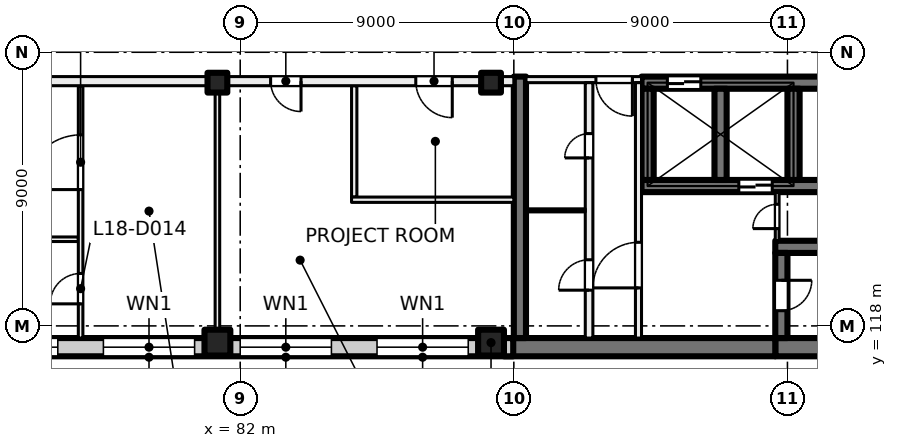
"""IFC4 building model, lengths in metres.
Left out: names, types, materials, properties, quantities, classifications, styles, units other than length and angle.
Written with IfcOpenShell. Run it as: python <this file> out.ifc"""

import sys

from ifc_helpers import new_model, si_unit, direction, frame, frame_2d, origin, origin_2d, place, context, subcontext, project, spatial, rectangle, extrude, element, fill, save


model = new_model("IFC4")
c1 = context("Model", 3, precision=1e-05, world=origin(), true_north=direction((0.0, 1.0)))
c2 = subcontext(c1, "Body", "Model", "MODEL_VIEW")
j1 = project(units=[si_unit("LENGTHUNIT", "METRE"), si_unit("PLANEANGLEUNIT", "RADIAN")], contexts=[c1])
p1 = place(None, origin())
s1 = spatial("IfcSite", under=j1, at=p1, CompositionType="ELEMENT")
p2 = place(p1, origin())
s2 = spatial("IfcBuilding", under=s1, at=p2, CompositionType="ELEMENT")
p3 = place(p2, frame((0.0, 0.0, 81.0)))
s3 = spatial("IfcBuildingStorey", under=s2, at=p3, CompositionType="ELEMENT", Elevation=81.0)
for number, where, z_axis, x_axis in (
    (1, (81.25, 126.0, 0.0), (0.0, 0.0, 1.0), (1.0, 0.0, 0.0)),
    (2, (90.25, 126.0, 0.0), (0.0, 0.0, 1.0), (1.0, 0.0, 0.0)),
):
    element("IfcColumn", number, at=place(p3, frame(where, z_axis=z_axis, x_axis=x_axis)), inside=s3, PredefinedType="COLUMN", context=c2, shape_type="SweptSolid", body=[
        extrude(rectangle(XDim=0.65, YDim=0.65, at=origin_2d()), origin(), (0.0, 0.0, 1.0), 4.0),
    ])
for number, where, z_axis, x_axis in (
    (3, (81.25, 117.45, 0.0), (0.0, 0.0, 1.0), (1.0, 0.0, 0.0)),
    (4, (90.25, 117.45, 0.0), (0.0, 0.0, 1.0), (1.0, 0.0, 0.0)),
):
    element("IfcColumn", number, at=place(p3, frame(where, z_axis=z_axis, x_axis=x_axis)), inside=s3, PredefinedType="COLUMN", context=c2, shape_type="SweptSolid", body=[
        extrude(rectangle(XDim=0.85, YDim=0.85, at=origin_2d()), origin(), (0.0, 0.0, 1.0), 4.0),
    ])
p4 = place(p3, frame((107.4, 117.3, 0.0), z_axis=(0.0, 0.0, 1.0), x_axis=(-1.0, 0.0, 0.0)))
e5 = element("IfcWall", 5, at=p4, inside=s3, PredefinedType="SHEAR", context=c2, shape_type="SweptSolid", body=[
    extrude(rectangle(XDim=7.8, YDim=0.6, at=frame_2d((3.9, 0.0))), origin(), (0.0, 0.0, 1.0), 4.0),
])
p5 = place(p3, frame((99.6, 117.3, 0.0), z_axis=(0.0, 0.0, 1.0), x_axis=(-1.0, 0.0, 0.0)))
e6 = element("IfcWall", 6, at=p5, inside=s3, PredefinedType="SHEAR", context=c2, shape_type="SweptSolid", body=[
    extrude(rectangle(XDim=8.925, YDim=0.6, at=frame_2d((4.462, 0.0))), origin(), (0.0, 0.0, 1.0), 4.0),
])
p6 = place(p3, frame((107.4, 120.6, 0.0), z_axis=(0.0, 0.0, 1.0), x_axis=(-1.0, 0.0, 0.0)))
e7 = element("IfcWall", 7, at=p6, inside=s3, PredefinedType="SHEAR", context=c2, shape_type="SweptSolid", body=[
    extrude(rectangle(XDim=7.8, YDim=0.4, at=frame_2d((3.9, 0.0))), origin(), (0.0, 0.0, 1.0), 4.0),
])
p7 = place(p3, frame((99.8, 120.4, 0.0), z_axis=(0.0, 0.0, 1.0), x_axis=(0.0, -1.0, 0.0)))
e8 = element("IfcWall", 8, at=p7, inside=s3, PredefinedType="SHEAR", context=c2, shape_type="SweptSolid", body=[
    extrude(rectangle(XDim=2.8, YDim=0.4, at=frame_2d((1.4, 0.0))), origin(), (0.0, 0.0, 1.0), 4.0),
])
p8 = place(p7, frame((0.9, 0.0, 0.0)))
e9 = element("IfcOpeningElement", 9, at=p8, cuts=e8, PredefinedType="OPENING", context=c2, shape_type="SweptSolid", body=[
    extrude(rectangle(XDim=1.0, YDim=2.1, at=frame_2d((0.5, 1.05))), frame((0.0, 0.21, 0.0), z_axis=(0.0, -1.0, 0.0), x_axis=(1.0, 0.0, 0.0)), (0.0, 0.0, 1.0), 0.42),
])
p9 = place(p3, frame((107.4, 126.0, 0.0), z_axis=(0.0, 0.0, 1.0), x_axis=(-1.0, 0.0, 0.0)))
e10 = element("IfcWall", 10, at=p9, inside=s3, PredefinedType="SHEAR", context=c2, shape_type="SweptSolid", body=[
    extrude(rectangle(XDim=12.2, YDim=0.4, at=frame_2d((6.1, 0.0))), origin(), (0.0, 0.0, 1.0), 4.0),
])
p10 = place(p9, frame((10.25, 0.0, 0.0)))
e11 = element("IfcOpeningElement", 11, at=p10, cuts=e10, PredefinedType="OPENING", context=c2, shape_type="SweptSolid", body=[
    extrude(rectangle(XDim=1.1, YDim=2.1, at=frame_2d((0.55, 1.05))), frame((0.0, 0.21, 0.0), z_axis=(0.0, -1.0, 0.0), x_axis=(1.0, 0.0, 0.0)), (0.0, 0.0, 1.0), 0.42),
])
p11 = place(p9, frame((0.7, 0.0, 0.0)))
e12 = element("IfcOpeningElement", 12, at=p11, cuts=e10, PredefinedType="OPENING", context=c2, shape_type="SweptSolid", body=[
    extrude(rectangle(XDim=0.8, YDim=2.1, at=frame_2d((0.4, 1.05))), frame((0.0, 0.21, 0.0), z_axis=(0.0, -1.0, 0.0), x_axis=(1.0, 0.0, 0.0)), (0.0, 0.0, 1.0), 0.42),
])
p12 = place(p3, frame((107.4, 122.6, 0.0), z_axis=(0.0, 0.0, 1.0), x_axis=(-1.0, 0.0, 0.0)))
e13 = element("IfcWall", 13, at=p12, inside=s3, PredefinedType="SHEAR", context=c2, shape_type="SweptSolid", body=[
    extrude(rectangle(XDim=12.2, YDim=0.4, at=frame_2d((6.1, 0.0))), origin(), (0.0, 0.0, 1.0), 4.0),
])
p13 = place(p12, frame((7.9, 0.0, 0.0)))
e14 = element("IfcOpeningElement", 14, at=p13, cuts=e13, PredefinedType="OPENING", context=c2, shape_type="SweptSolid", body=[
    extrude(rectangle(XDim=1.1, YDim=2.1, at=frame_2d((0.55, 1.05))), frame((0.0, 0.21, 0.0), z_axis=(0.0, -1.0, 0.0), x_axis=(1.0, 0.0, 0.0)), (0.0, 0.0, 1.0), 0.42),
])
for number, where, z_axis, x_axis in (
    (15, (100.2, 125.8, 0.0), (0.0, 0.0, 1.0), (0.0, -1.0, 0.0)),
    (16, (97.8, 125.8, 0.0), (0.0, 0.0, 1.0), (0.0, -1.0, 0.0)),
    (17, (95.4, 125.8, 0.0), (0.0, 0.0, 1.0), (0.0, -1.0, 0.0)),
):
    element("IfcWall", number, at=place(p3, frame(where, z_axis=z_axis, x_axis=x_axis)), inside=s3, PredefinedType="SHEAR", context=c2, shape_type="SweptSolid", body=[
        extrude(rectangle(XDim=3.0, YDim=0.4, at=frame_2d((1.5, 0.0))), origin(), (0.0, 0.0, 1.0), 4.0),
    ])
p14 = place(p3, frame((91.2, 126.2, 0.0), z_axis=(0.0, 0.0, 1.0), x_axis=(0.0, -1.0, 0.0)))
e18 = element("IfcWall", 18, at=p14, inside=s3, PredefinedType="SHEAR", context=c2, shape_type="SweptSolid", body=[
    extrude(rectangle(XDim=8.6, YDim=0.4, at=frame_2d((4.3, 0.0))), origin(), (0.0, 0.0, 1.0), 4.0),
])
p15 = place(p3, frame((90.98, 117.3, 0.0), z_axis=(0.0, 0.0, 1.0), x_axis=(-1.0, 0.0, 0.0)))
e19 = element("IfcWall", 19, at=p15, inside=s3, PredefinedType="SOLIDWALL", context=c2, shape_type="SweptSolid", body=[
    extrude(rectangle(XDim=33.745, YDim=0.6, at=frame_2d((16.873, 0.0))), origin(), (0.0, 0.0, 1.0), 3.625),
])
p16 = place(p15, frame((1.48, 0.0, 0.9)))
e20 = element("IfcOpeningElement", 20, at=p16, cuts=e19, PredefinedType="OPENING", context=c2, shape_type="SweptSolid", body=[
    extrude(rectangle(XDim=3.0, YDim=2.4, at=frame_2d((1.5, 1.2))), frame((0.0, 0.31, 0.0), z_axis=(0.0, -1.0, 0.0), x_axis=(1.0, 0.0, 0.0)), (0.0, 0.0, 1.0), 0.62),
])
p17 = place(p15, frame((5.98, 0.0, 0.9)))
e21 = element("IfcOpeningElement", 21, at=p17, cuts=e19, PredefinedType="OPENING", context=c2, shape_type="SweptSolid", body=[
    extrude(rectangle(XDim=3.0, YDim=2.4, at=frame_2d((1.5, 1.2))), frame((0.0, 0.31, 0.0), z_axis=(0.0, -1.0, 0.0), x_axis=(1.0, 0.0, 0.0)), (0.0, 0.0, 1.0), 0.62),
])
p18 = place(p15, frame((10.48, 0.0, 0.9)))
e22 = element("IfcOpeningElement", 22, at=p18, cuts=e19, PredefinedType="OPENING", context=c2, shape_type="SweptSolid", body=[
    extrude(rectangle(XDim=3.0, YDim=2.4, at=frame_2d((1.5, 1.2))), frame((0.0, 0.31, 0.0), z_axis=(0.0, -1.0, 0.0), x_axis=(1.0, 0.0, 0.0)), (0.0, 0.0, 1.0), 0.62),
])
p19 = place(p15, frame((14.98, 0.0, 0.9)))
e23 = element("IfcOpeningElement", 23, at=p19, cuts=e19, PredefinedType="OPENING", context=c2, shape_type="SweptSolid", body=[
    extrude(rectangle(XDim=3.0, YDim=2.4, at=frame_2d((1.5, 1.2))), frame((0.0, 0.31, 0.0), z_axis=(0.0, -1.0, 0.0), x_axis=(1.0, 0.0, 0.0)), (0.0, 0.0, 1.0), 0.62),
])
p20 = place(p15, frame((19.48, 0.0, 0.9)))
e24 = element("IfcOpeningElement", 24, at=p20, cuts=e19, PredefinedType="OPENING", context=c2, shape_type="SweptSolid", body=[
    extrude(rectangle(XDim=3.0, YDim=2.4, at=frame_2d((1.5, 1.2))), frame((0.0, 0.31, 0.0), z_axis=(0.0, -1.0, 0.0), x_axis=(1.0, 0.0, 0.0)), (0.0, 0.0, 1.0), 0.62),
])
p21 = place(p15, frame((24.58, 0.0, 0.0)))
e25 = element("IfcOpeningElement", 25, at=p21, cuts=e19, PredefinedType="OPENING", context=c2, shape_type="SweptSolid", body=[
    extrude(rectangle(XDim=1.8, YDim=2.4, at=frame_2d((0.9, 1.2))), frame((0.0, 0.31, 0.0), z_axis=(0.0, -1.0, 0.0), x_axis=(1.0, 0.0, 0.0)), (0.0, 0.0, 1.0), 0.62),
])
p22 = place(p15, frame((28.48, 0.0, 0.9)))
e26 = element("IfcOpeningElement", 26, at=p22, cuts=e19, PredefinedType="OPENING", context=c2, shape_type="SweptSolid", body=[
    extrude(rectangle(XDim=3.0, YDim=2.4, at=frame_2d((1.5, 1.2))), frame((0.0, 0.31, 0.0), z_axis=(0.0, -1.0, 0.0), x_axis=(1.0, 0.0, 0.0)), (0.0, 0.0, 1.0), 0.62),
])
p23 = place(p3, frame((95.2, 126.1, 0.0), z_axis=(0.0, 0.0, 1.0), x_axis=(-1.0, 0.0, 0.0)))
e27 = element("IfcWall", 27, at=p23, inside=s3, PredefinedType="PARTITIONING", context=c2, shape_type="SweptSolid", body=[
    extrude(rectangle(XDim=3.8, YDim=0.2, at=frame_2d((1.9, 0.0))), origin(), (0.0, 0.0, 1.0), 3.625),
])
p24 = place(p23, frame((0.3, 0.0, 0.0)))
e28 = element("IfcOpeningElement", 28, at=p24, cuts=e27, PredefinedType="OPENING", context=c2, shape_type="SweptSolid", body=[
    extrude(rectangle(XDim=1.2, YDim=2.1, at=frame_2d((0.6, 1.05))), frame((0.0, 0.11, 0.0), z_axis=(0.0, -1.0, 0.0), x_axis=(1.0, 0.0, 0.0)), (0.0, 0.0, 1.0), 0.22),
])
p25 = place(p3, frame((95.1, 117.6, 0.0), z_axis=(0.0, 0.0, 1.0), x_axis=(0.0, 1.0, 0.0)))
e29 = element("IfcWall", 29, at=p25, inside=s3, PredefinedType="PARTITIONING", context=c2, shape_type="SweptSolid", body=[
    extrude(rectangle(XDim=8.4, YDim=0.2, at=frame_2d((4.2, 0.0))), origin(), (0.0, 0.0, 1.0), 3.625),
])
p26 = place(p25, frame((1.65, 0.0, 0.0)))
e30 = element("IfcOpeningElement", 30, at=p26, cuts=e29, PredefinedType="OPENING", context=c2, shape_type="SweptSolid", body=[
    extrude(rectangle(XDim=1.5, YDim=2.1, at=frame_2d((0.75, 1.05))), frame((0.0, 0.11, 0.0), z_axis=(0.0, -1.0, 0.0), x_axis=(1.0, 0.0, 0.0)), (0.0, 0.0, 1.0), 0.22),
])
p27 = place(p3, frame((93.475, 117.6, 0.0), z_axis=(0.0, 0.0, 1.0), x_axis=(0.0, 1.0, 0.0)))
e31 = element("IfcWall", 31, at=p27, inside=s3, PredefinedType="PARTITIONING", context=c2, shape_type="SweptSolid", body=[
    extrude(rectangle(XDim=8.4, YDim=0.25, at=frame_2d((4.2, 0.0))), origin(), (0.0, 0.0, 1.0), 3.625),
])
p28 = place(p27, frame((5.925, 0.0, 0.0)))
e32 = element("IfcOpeningElement", 32, at=p28, cuts=e31, PredefinedType="OPENING", context=c2, shape_type="SweptSolid", body=[
    extrude(rectangle(XDim=0.8, YDim=2.1, at=frame_2d((0.4, 1.05))), frame((0.0, 0.135, 0.0), z_axis=(0.0, -1.0, 0.0), x_axis=(1.0, 0.0, 0.0)), (0.0, 0.0, 1.0), 0.27),
])
p29 = place(p27, frame((1.575, 0.0, 0.0)))
e33 = element("IfcOpeningElement", 33, at=p29, cuts=e31, PredefinedType="OPENING", context=c2, shape_type="SweptSolid", body=[
    extrude(rectangle(XDim=1.0, YDim=2.1, at=frame_2d((0.5, 1.05))), frame((0.0, 0.135, 0.0), z_axis=(0.0, -1.0, 0.0), x_axis=(1.0, 0.0, 0.0)), (0.0, 0.0, 1.0), 0.27),
])
p30 = place(p3, frame((99.663, 120.8, 0.0), z_axis=(0.0, 0.0, 1.0), x_axis=(0.0, 1.0, 0.0)))
e34 = element("IfcWall", 34, at=p30, inside=s3, PredefinedType="PARTITIONING", context=c2, shape_type="SweptSolid", body=[
    extrude(rectangle(XDim=1.6, YDim=0.125, at=frame_2d((0.8, 0.0))), origin(), (0.0, 0.0, 1.0), 3.625),
])
p31 = place(p30, frame((0.4, 0.0, 0.0)))
e35 = element("IfcOpeningElement", 35, at=p31, cuts=e34, PredefinedType="OPENING", context=c2, shape_type="SweptSolid", body=[
    extrude(rectangle(XDim=0.8, YDim=2.1, at=frame_2d((0.4, 1.05))), frame((0.0, 0.073, 0.0), z_axis=(0.0, -1.0, 0.0), x_axis=(1.0, 0.0, 0.0)), (0.0, 0.0, 1.0), 0.145),
])
p32 = place(p3, frame((93.35, 121.8, 0.0), z_axis=(0.0, 0.0, 1.0), x_axis=(-1.0, 0.0, 0.0)))
e36 = element("IfcWall", 36, at=p32, inside=s3, PredefinedType="PARTITIONING", context=c2, shape_type="SweptSolid", body=[
    extrude(rectangle(XDim=1.95, YDim=0.1, at=frame_2d((0.975, 0.0))), origin(), (0.0, 0.0, 1.0), 3.625),
])
p33 = place(p3, frame((72.325, 120.85, 0.0), z_axis=(0.0, 0.0, 1.0), x_axis=(1.0, 0.0, 0.0)))
e37 = element("IfcWall", 37, at=p33, inside=s3, PredefinedType="PARTITIONING", context=c2, shape_type="SweptSolid", body=[
    extrude(rectangle(XDim=4.35, YDim=0.15, at=frame_2d((2.175, 0.0))), origin(), (0.0, 0.0, 1.0), 3.625),
])
p34 = place(p3, frame((76.75, 117.6, 0.0), z_axis=(0.0, 0.0, 1.0), x_axis=(0.0, 1.0, 0.0)))
e38 = element("IfcWall", 38, at=p34, inside=s3, PredefinedType="PARTITIONING", context=c2, shape_type="SweptSolid", body=[
    extrude(rectangle(XDim=8.3, YDim=0.15, at=frame_2d((4.15, 0.0))), origin(), (0.0, 0.0, 1.0), 3.625),
])
p35 = place(p34, frame((1.125, 0.0, 0.0)))
e39 = element("IfcOpeningElement", 39, at=p35, cuts=e38, PredefinedType="OPENING", context=c2, shape_type="SweptSolid", body=[
    extrude(rectangle(XDim=1.0, YDim=2.1, at=frame_2d((0.5, 1.05))), frame((0.0, 0.085, 0.0), z_axis=(0.0, -1.0, 0.0), x_axis=(1.0, 0.0, 0.0)), (0.0, 0.0, 1.0), 0.17),
])
p36 = place(p34, frame((4.884, 0.0, 0.0)))
e40 = element("IfcOpeningElement", 40, at=p36, cuts=e38, PredefinedType="OPENING", context=c2, shape_type="SweptSolid", body=[
    extrude(rectangle(XDim=1.8, YDim=2.1, at=frame_2d((0.9, 1.05))), frame((0.0, 0.085, 0.0), z_axis=(0.0, -1.0, 0.0), x_axis=(1.0, 0.0, 0.0)), (0.0, 0.0, 1.0), 0.17),
])
p37 = place(p3, frame((81.25, 117.6, 0.0), z_axis=(0.0, 0.0, 1.0), x_axis=(0.0, 1.0, 0.0)))
e41 = element("IfcWall", 41, at=p37, inside=s3, PredefinedType="PARTITIONING", context=c2, shape_type="SweptSolid", body=[
    extrude(rectangle(XDim=8.3, YDim=0.15, at=frame_2d((4.15, 0.0))), origin(), (0.0, 0.0, 1.0), 3.625),
])
p38 = place(p3, frame((85.75, 122.238, 0.0), z_axis=(0.0, 0.0, 1.0), x_axis=(0.0, 1.0, 0.0)))
e42 = element("IfcWall", 42, at=p38, inside=s3, PredefinedType="PARTITIONING", context=c2, shape_type="SweptSolid", body=[
    extrude(rectangle(XDim=3.662, YDim=0.175, at=frame_2d((1.831, 0.0))), origin(), (0.0, 0.0, 1.0), 3.625),
])
p39 = place(p3, frame((91.0, 122.15, 0.0), z_axis=(0.0, 0.0, 1.0), x_axis=(-1.0, 0.0, 0.0)))
e43 = element("IfcWall", 43, at=p39, inside=s3, PredefinedType="PARTITIONING", context=c2, shape_type="SweptSolid", body=[
    extrude(rectangle(XDim=5.338, YDim=0.175, at=frame_2d((2.669, 0.0))), origin(), (0.0, 0.0, 1.0), 3.625),
])
p40 = place(p3, frame((91.0, 126.05, 0.0), z_axis=(0.0, 0.0, 1.0), x_axis=(-1.0, 0.0, 0.0)))
e44 = element("IfcWall", 44, at=p40, inside=s3, PredefinedType="PARTITIONING", context=c2, shape_type="SweptSolid", body=[
    extrude(rectangle(XDim=43.785, YDim=0.3, at=frame_2d((21.893, 0.0))), origin(), (0.0, 0.0, 1.0), 3.625),
])
p41 = place(p40, frame((2.025, 0.0, 0.0)))
e45 = element("IfcOpeningElement", 45, at=p41, cuts=e44, PredefinedType="OPENING", context=c2, shape_type="SweptSolid", body=[
    extrude(rectangle(XDim=1.2, YDim=2.1, at=frame_2d((0.6, 1.05))), frame((0.0, 0.16, 0.0), z_axis=(0.0, -1.0, 0.0), x_axis=(1.0, 0.0, 0.0)), (0.0, 0.0, 1.0), 0.32),
])
p42 = place(p40, frame((7.0, 0.0, 0.0)))
e46 = element("IfcOpeningElement", 46, at=p42, cuts=e44, PredefinedType="OPENING", context=c2, shape_type="SweptSolid", body=[
    extrude(rectangle(XDim=1.0, YDim=2.1, at=frame_2d((0.5, 1.05))), frame((0.0, 0.16, 0.0), z_axis=(0.0, -1.0, 0.0), x_axis=(1.0, 0.0, 0.0)), (0.0, 0.0, 1.0), 0.32),
])
p43 = place(p40, frame((16.0, 0.0, 0.0)))
e47 = element("IfcOpeningElement", 47, at=p43, cuts=e44, PredefinedType="OPENING", context=c2, shape_type="SweptSolid", body=[
    extrude(rectangle(XDim=1.0, YDim=2.1, at=frame_2d((0.5, 1.05))), frame((0.0, 0.16, 0.0), z_axis=(0.0, -1.0, 0.0), x_axis=(1.0, 0.0, 0.0)), (0.0, 0.0, 1.0), 0.32),
])
p44 = place(p40, frame((28.85, 0.0, 0.0)))
e48 = element("IfcOpeningElement", 48, at=p44, cuts=e44, PredefinedType="OPENING", context=c2, shape_type="SweptSolid", body=[
    extrude(rectangle(XDim=1.8, YDim=2.1, at=frame_2d((0.9, 1.05))), frame((0.0, 0.16, 0.0), z_axis=(0.0, -1.0, 0.0), x_axis=(1.0, 0.0, 0.0)), (0.0, 0.0, 1.0), 0.32),
])
p45 = place(p40, frame((39.296, 0.0, 0.0)))
e49 = element("IfcOpeningElement", 49, at=p45, cuts=e44, PredefinedType="OPENING", context=c2, shape_type="SweptSolid", body=[
    extrude(rectangle(XDim=1.8, YDim=2.1, at=frame_2d((0.9, 1.05))), frame((0.0, 0.16, 0.0), z_axis=(0.0, -1.0, 0.0), x_axis=(1.0, 0.0, 0.0)), (0.0, 0.0, 1.0), 0.32),
])
p46 = place(p16, origin())
e50 = element("IfcWindow", 50, at=p46, inside=s3, PartitioningType="SINGLE_PANEL", PredefinedType="WINDOW", context=c2, shape_type="SweptSolid", body=[
    extrude(rectangle(XDim=3.0, YDim=2.4, at=frame_2d((1.5, 1.2))), frame((0.0, 0.03, 0.0), z_axis=(0.0, -1.0, 0.0), x_axis=(1.0, 0.0, 0.0)), (0.0, 0.0, 1.0), 0.06),
])
fill(e20, e50)
p47 = place(p17, origin())
e51 = element("IfcWindow", 51, at=p47, inside=s3, PartitioningType="SINGLE_PANEL", PredefinedType="WINDOW", context=c2, shape_type="SweptSolid", body=[
    extrude(rectangle(XDim=3.0, YDim=2.4, at=frame_2d((1.5, 1.2))), frame((0.0, 0.03, 0.0), z_axis=(0.0, -1.0, 0.0), x_axis=(1.0, 0.0, 0.0)), (0.0, 0.0, 1.0), 0.06),
])
fill(e21, e51)
p48 = place(p18, origin())
e52 = element("IfcWindow", 52, at=p48, inside=s3, PartitioningType="SINGLE_PANEL", PredefinedType="WINDOW", context=c2, shape_type="SweptSolid", body=[
    extrude(rectangle(XDim=3.0, YDim=2.4, at=frame_2d((1.5, 1.2))), frame((0.0, 0.03, 0.0), z_axis=(0.0, -1.0, 0.0), x_axis=(1.0, 0.0, 0.0)), (0.0, 0.0, 1.0), 0.06),
])
fill(e22, e52)
p49 = place(p19, origin())
e53 = element("IfcWindow", 53, at=p49, inside=s3, PartitioningType="SINGLE_PANEL", PredefinedType="WINDOW", context=c2, shape_type="SweptSolid", body=[
    extrude(rectangle(XDim=3.0, YDim=2.4, at=frame_2d((1.5, 1.2))), frame((0.0, 0.03, 0.0), z_axis=(0.0, -1.0, 0.0), x_axis=(1.0, 0.0, 0.0)), (0.0, 0.0, 1.0), 0.06),
])
fill(e23, e53)
p50 = place(p10, origin())
e54 = element("IfcDoor", 54, at=p50, inside=s3, OperationType="DOUBLE_DOOR_SLIDING", PredefinedType="DOOR", context=c2, shape_type="SweptSolid", body=[
    extrude(rectangle(XDim=1.1, YDim=2.1, at=frame_2d((0.55, 1.05))), frame((0.0, 0.025, 0.0), z_axis=(0.0, -1.0, 0.0), x_axis=(1.0, 0.0, 0.0)), (0.0, 0.0, 1.0), 0.05),
])
fill(e11, e54)
p51 = place(p24, origin())
e55 = element("IfcDoor", 55, at=p51, inside=s3, OperationType="DOUBLE_DOOR_SINGLE_SWING", PredefinedType="DOOR", context=c2, shape_type="SweptSolid", body=[
    extrude(rectangle(XDim=1.2, YDim=2.1, at=frame_2d((0.6, 1.05))), frame((0.0, 0.025, 0.0), z_axis=(0.0, -1.0, 0.0), x_axis=(1.0, 0.0, 0.0)), (0.0, 0.0, 1.0), 0.05),
])
fill(e28, e55)
p52 = place(p26, origin())
e56 = element("IfcDoor", 56, at=p52, inside=s3, OperationType="DOUBLE_DOOR_SINGLE_SWING", PredefinedType="DOOR", context=c2, shape_type="SweptSolid", body=[
    extrude(rectangle(XDim=1.5, YDim=2.1, at=frame_2d((0.75, 1.05))), frame((0.0, 0.025, 0.0), z_axis=(0.0, -1.0, 0.0), x_axis=(1.0, 0.0, 0.0)), (0.0, 0.0, 1.0), 0.05),
])
fill(e30, e56)
p53 = place(p8, origin())
e57 = element("IfcDoor", 57, at=p53, inside=s3, OperationType="SINGLE_SWING_LEFT", PredefinedType="DOOR", context=c2, shape_type="SweptSolid", body=[
    extrude(rectangle(XDim=1.0, YDim=2.1, at=frame_2d((0.5, 1.05))), frame((0.0, 0.025, 0.0), z_axis=(0.0, -1.0, 0.0), x_axis=(1.0, 0.0, 0.0)), (0.0, 0.0, 1.0), 0.05),
])
fill(e9, e57)
p54 = place(p31, origin())
e58 = element("IfcDoor", 58, at=p54, inside=s3, OperationType="SINGLE_SWING_RIGHT", PredefinedType="DOOR", context=c2, shape_type="SweptSolid", body=[
    extrude(rectangle(XDim=0.8, YDim=2.1, at=frame_2d((0.4, 1.05))), frame((0.0, 0.025, 0.0), z_axis=(0.0, -1.0, 0.0), x_axis=(1.0, 0.0, 0.0)), (0.0, 0.0, 1.0), 0.05),
])
fill(e35, e58)
p55 = place(p28, origin())
e59 = element("IfcDoor", 59, at=p55, inside=s3, OperationType="SINGLE_SWING_LEFT", PredefinedType="DOOR", context=c2, shape_type="SweptSolid", body=[
    extrude(rectangle(XDim=0.8, YDim=2.1, at=frame_2d((0.4, 1.05))), frame((0.0, 0.025, 0.0), z_axis=(0.0, -1.0, 0.0), x_axis=(1.0, 0.0, 0.0)), (0.0, 0.0, 1.0), 0.05),
])
fill(e32, e59)
p56 = place(p29, origin())
e60 = element("IfcDoor", 60, at=p56, inside=s3, OperationType="SINGLE_SWING_RIGHT", PredefinedType="DOOR", context=c2, shape_type="SweptSolid", body=[
    extrude(rectangle(XDim=1.0, YDim=2.1, at=frame_2d((0.5, 1.05))), frame((0.0, 0.025, 0.0), z_axis=(0.0, -1.0, 0.0), x_axis=(1.0, 0.0, 0.0)), (0.0, 0.0, 1.0), 0.05),
])
fill(e33, e60)
p57 = place(p13, origin())
e61 = element("IfcDoor", 61, at=p57, inside=s3, OperationType="DOUBLE_DOOR_SLIDING", PredefinedType="DOOR", context=c2, shape_type="SweptSolid", body=[
    extrude(rectangle(XDim=1.1, YDim=2.1, at=frame_2d((0.55, 1.05))), frame((0.0, 0.025, 0.0), z_axis=(0.0, -1.0, 0.0), x_axis=(1.0, 0.0, 0.0)), (0.0, 0.0, 1.0), 0.05),
])
fill(e14, e61)
p58 = place(p41, origin())
e62 = element("IfcDoor", 62, at=p58, inside=s3, OperationType="DOUBLE_DOOR_SINGLE_SWING", PredefinedType="DOOR", context=c2, shape_type="SweptSolid", body=[
    extrude(rectangle(XDim=1.2, YDim=2.1, at=frame_2d((0.6, 1.05))), frame((0.0, 0.025, 0.0), z_axis=(0.0, -1.0, 0.0), x_axis=(1.0, 0.0, 0.0)), (0.0, 0.0, 1.0), 0.05),
])
fill(e45, e62)
p59 = place(p42, origin())
e63 = element("IfcDoor", 63, at=p59, inside=s3, OperationType="SINGLE_SWING_RIGHT", PredefinedType="DOOR", context=c2, shape_type="SweptSolid", body=[
    extrude(rectangle(XDim=1.0, YDim=2.1, at=frame_2d((0.5, 1.05))), frame((0.0, 0.025, 0.0), z_axis=(0.0, -1.0, 0.0), x_axis=(1.0, 0.0, 0.0)), (0.0, 0.0, 1.0), 0.05),
])
fill(e46, e63)
p60 = place(p35, origin())
e64 = element("IfcDoor", 64, at=p60, inside=s3, OperationType="SINGLE_SWING_RIGHT", PredefinedType="DOOR", context=c2, shape_type="SweptSolid", body=[
    extrude(rectangle(XDim=1.0, YDim=2.1, at=frame_2d((0.5, 1.05))), frame((0.0, 0.025, 0.0), z_axis=(0.0, -1.0, 0.0), x_axis=(1.0, 0.0, 0.0)), (0.0, 0.0, 1.0), 0.05),
])
fill(e39, e64)
p61 = place(p36, origin())
e65 = element("IfcDoor", 65, at=p61, inside=s3, OperationType="DOUBLE_DOOR_SINGLE_SWING", PredefinedType="DOOR", context=c2, shape_type="SweptSolid", body=[
    extrude(rectangle(XDim=1.8, YDim=2.1, at=frame_2d((0.9, 1.05))), frame((0.0, 0.025, 0.0), z_axis=(0.0, -1.0, 0.0), x_axis=(1.0, 0.0, 0.0)), (0.0, 0.0, 1.0), 0.05),
])
fill(e40, e65)
save(model, sys.argv[1])
